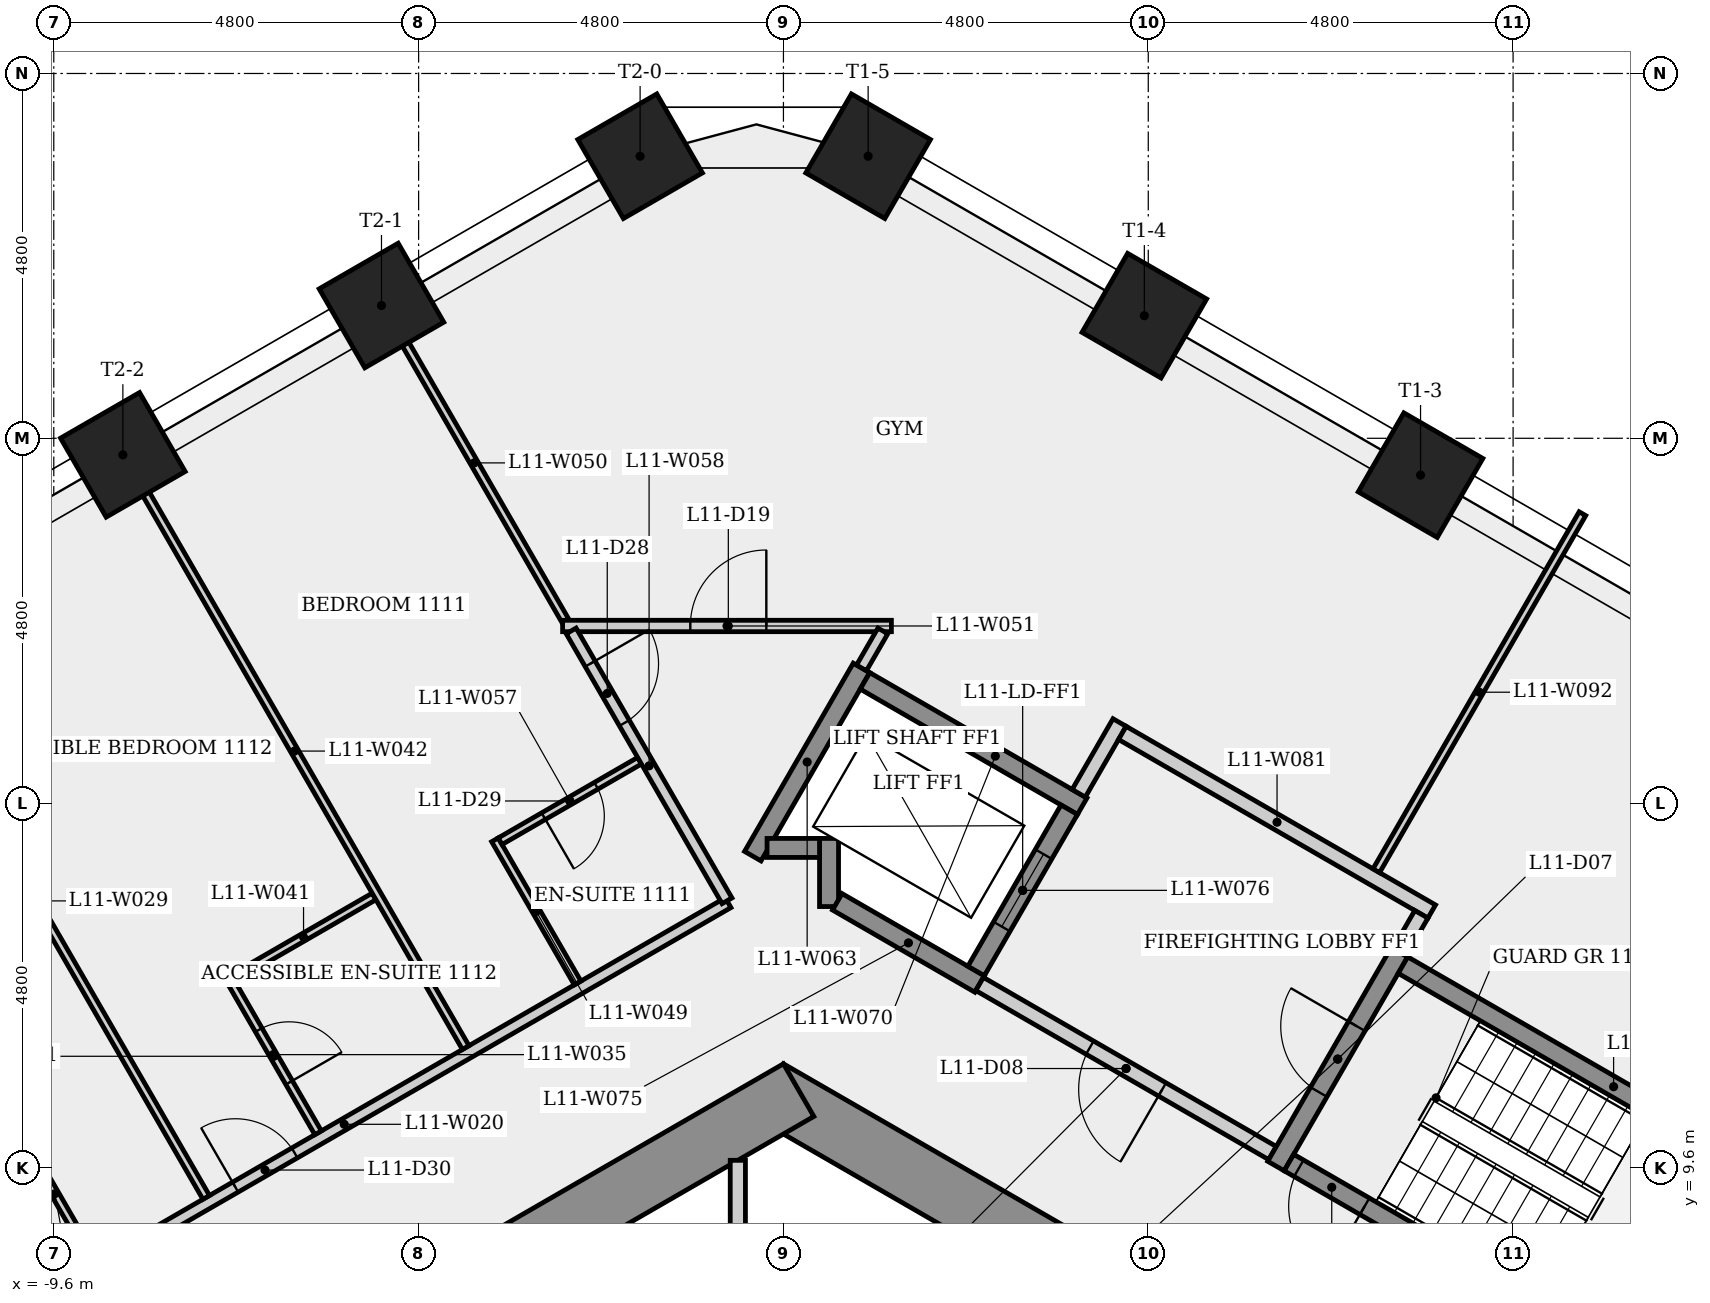
"""IFC4 building model, lengths in metres.
Left out: names, types, materials, properties, quantities, classifications, styles, units other than length and angle.
Written with IfcOpenShell. Run it as: python <this file> out.ifc"""

import sys

from ifc_helpers import new_model, si_unit, direction, frame, frame_2d, origin, origin_2d, place, context, subcontext, project, spatial, rectangle, extrude, element, fill, save


model = new_model("IFC4")
c1 = context("Model", 3, precision=1e-05, world=origin(), true_north=direction((0.0, 1.0)))
c2 = subcontext(c1, "Body", "Model", "MODEL_VIEW")
j1 = project(units=[si_unit("LENGTHUNIT", "METRE"), si_unit("PLANEANGLEUNIT", "RADIAN")], contexts=[c1])
p1 = place(None, origin())
s1 = spatial("IfcSite", under=j1, at=p1, CompositionType="ELEMENT")
p2 = place(p1, origin())
s2 = spatial("IfcBuilding", under=s1, at=p2, CompositionType="ELEMENT")
p3 = place(p2, frame((0.0, 0.0, 45.9)))
s3 = spatial("IfcBuildingStorey", under=s2, at=p3, CompositionType="ELEMENT", Elevation=45.9)
p4 = place(p3, frame((9.3, 5.138, 0.0), z_axis=(0.0, 0.0, 1.0), x_axis=(-0.866023993627, 0.500002442456, 0.0)))
e1 = element("IfcWall", 1, at=p4, inside=s3, PredefinedType="SHEAR", context=c2, shape_type="SweptSolid", body=[
    extrude(rectangle(XDim=10.97, YDim=0.8, at=frame_2d((5.485, 0.0))), origin(), (0.0, 0.0, 1.0), 3.4),
])
p5 = place(p4, frame((5.509, 0.0, 0.0)))
e2 = element("IfcOpeningElement", 2, at=p5, cuts=e1, PredefinedType="OPENING", context=c2, shape_type="SweptSolid", body=[
    extrude(rectangle(XDim=0.9, YDim=2.1, at=frame_2d((0.45, 1.05))), frame((0.0, 0.41, 0.0), z_axis=(0.0, -1.0, 0.0), x_axis=(1.0, 0.0, 0.0)), (0.0, 0.0, 1.0), 0.82),
])
p6 = place(p3, frame((0.2, 10.623, 0.0), z_axis=(0.0, 0.0, 1.0), x_axis=(-0.866023993627, -0.500002442456, 0.0)))
e3 = element("IfcWall", 3, at=p6, inside=s3, PredefinedType="SHEAR", context=c2, shape_type="SweptSolid", body=[
    extrude(rectangle(XDim=10.97, YDim=0.8, at=frame_2d((5.485, 0.0))), origin(), (0.0, 0.0, 1.0), 3.4),
])
p7 = place(p6, frame((6.993, 0.0, 0.0)))
e4 = element("IfcOpeningElement", 4, at=p7, cuts=e3, PredefinedType="OPENING", context=c2, shape_type="SweptSolid", body=[
    extrude(rectangle(XDim=0.9, YDim=2.1, at=frame_2d((0.45, 1.05))), frame((0.0, 0.41, 0.0), z_axis=(0.0, -1.0, 0.0), x_axis=(1.0, 0.0, 0.0)), (0.0, 0.0, 1.0), 0.82),
])
for number, where, z_axis, x_axis in (
    (5, (8.382, 18.715, 0.0), (0.0, 0.0, 1.0), (0.5, 0.866, 0.0)),
    (6, (4.748, 20.813, 0.0), (0.0, 0.0, 1.0), (0.5, 0.866, 0.0)),
    (7, (1.114, 22.911, 0.0), (0.0, 0.0, 1.0), (0.5, 0.866, 0.0)),
    (8, (-1.886, 22.911, 0.0), (0.0, 0.0, 1.0), (-0.5, 0.866, 0.0)),
    (9, (-5.288, 20.947, 0.0), (0.0, 0.0, 1.0), (-0.5, 0.866, 0.0)),
    (10, (-8.691, 18.982, 0.0), (0.0, 0.0, 1.0), (-0.5, 0.866, 0.0)),
):
    element("IfcColumn", number, at=place(p3, frame(where, z_axis=z_axis, x_axis=x_axis)), inside=s3, PredefinedType="COLUMN", context=c2, shape_type="SweptSolid", body=[
        extrude(rectangle(XDim=1.2, YDim=1.2, at=origin_2d()), origin(), (0.0, 0.0, 1.0), 3.4),
    ])
p8 = place(p3, frame((-10.83, 7.258, 0.0), z_axis=(0.0, 0.0, 1.0), x_axis=(0.86602420186, 0.500002081789, 0.0)))
e11 = element("IfcWall", 11, at=p8, inside=s3, PredefinedType="PARTITIONING", context=c2, shape_type="SweptSolid", body=[
    extrude(rectangle(XDim=11.664, YDim=0.15, at=frame_2d((5.832, 0.0))), origin(), (0.0, 0.0, 1.0), 3.05),
])
p9 = place(p8, frame((4.178, 0.0, 0.0)))
e12 = element("IfcOpeningElement", 12, at=p9, cuts=e11, PredefinedType="OPENING", context=c2, shape_type="SweptSolid", body=[
    extrude(rectangle(XDim=0.9, YDim=2.1, at=frame_2d((0.45, 1.05))), frame((0.0, 0.085, 0.0), z_axis=(0.0, -1.0, 0.0), x_axis=(1.0, 0.0, 0.0)), (0.0, 0.0, 1.0), 0.17),
])
p10 = place(p3, frame((-9.067, 8.362, 0.0), z_axis=(0.0, 0.0, 1.0), x_axis=(-0.500061949227, 0.865989634427, 0.0)))
e13 = element("IfcWall", 13, at=p10, inside=s3, PredefinedType="PARTITIONING", context=c2, shape_type="SweptSolid", body=[
    extrude(rectangle(XDim=2.075, YDim=0.1, at=frame_2d((1.038, 0.0))), origin(), (0.0, 0.0, 1.0), 3.05),
])
p11 = place(p3, frame((-7.595, 9.212, 0.0), z_axis=(0.0, 0.0, 1.0), x_axis=(-0.500009404554, 0.866019973994, 0.0)))
e14 = element("IfcWall", 14, at=p11, inside=s3, PredefinedType="PARTITIONING", context=c2, shape_type="SweptSolid", body=[
    extrude(rectangle(XDim=9.01, YDim=0.1, at=frame_2d((4.505, 0.0))), origin(), (0.0, 0.0, 1.0), 3.05),
])
p12 = place(p3, frame((-7.31, 12.119, 0.0), z_axis=(0.0, 0.0, 1.0), x_axis=(0.499986429846, -0.866033238375, 0.0)))
e15 = element("IfcWall", 15, at=p12, inside=s3, PredefinedType="PARTITIONING", context=c2, shape_type="SweptSolid", body=[
    extrude(rectangle(XDim=2.375, YDim=0.1, at=frame_2d((1.188, 0.0))), origin(), (0.0, 0.0, 1.0), 3.05),
])
p13 = place(p12, frame((0.812, 0.0, 0.0)))
e16 = element("IfcOpeningElement", 16, at=p13, cuts=e15, PredefinedType="OPENING", context=c2, shape_type="SweptSolid", body=[
    extrude(rectangle(XDim=0.8, YDim=2.1, at=frame_2d((0.4, 1.05))), frame((0.0, 0.06, 0.0), z_axis=(0.0, -1.0, 0.0), x_axis=(1.0, 0.0, 0.0)), (0.0, 0.0, 1.0), 0.12),
])
p14 = place(p3, frame((-5.386, 13.172, 0.0), z_axis=(0.0, 0.0, 1.0), x_axis=(-0.86604708139, -0.499962451406, 0.0)))
e17 = element("IfcWall", 17, at=p14, inside=s3, PredefinedType="PARTITIONING", context=c2, shape_type="SweptSolid", body=[
    extrude(rectangle(XDim=2.143, YDim=0.1, at=frame_2d((1.071, 0.0))), origin(), (0.0, 0.0, 1.0), 3.05),
])
p15 = place(p3, frame((-8.685, 18.986, 0.0), z_axis=(0.0, 0.0, 1.0), x_axis=(0.499989081013, -0.866031707772, 0.0)))
e18 = element("IfcWall", 18, at=p15, inside=s3, PredefinedType="PARTITIONING", context=c2, shape_type="SweptSolid", body=[
    extrude(rectangle(XDim=9.01, YDim=0.1, at=frame_2d((4.505, 0.0))), origin(), (0.0, 0.0, 1.0), 3.05),
])
p16 = place(p3, frame((-3.795, 13.917, 0.0), z_axis=(0.0, 0.0, 1.0), x_axis=(0.499978335414, -0.866037911478, 0.0)))
e19 = element("IfcWall", 19, at=p16, inside=s3, PredefinedType="PARTITIONING", context=c2, shape_type="SweptSolid", body=[
    extrude(rectangle(XDim=2.175, YDim=0.1, at=frame_2d((1.087, 0.0))), origin(), (0.0, 0.0, 1.0), 3.05),
])
p17 = place(p3, frame((-2.868, 16.795, 0.0), z_axis=(0.0, 0.0, 1.0), x_axis=(-0.499980464184, 0.866036682499, 0.0)))
e20 = element("IfcWall", 20, at=p17, inside=s3, PredefinedType="PARTITIONING", context=c2, shape_type="SweptSolid", body=[
    extrude(rectangle(XDim=4.805, YDim=0.1, at=frame_2d((2.403, 0.0))), origin(), (0.0, 0.0, 1.0), 3.05),
])
p18 = place(p3, frame((-2.905, 16.73, 0.0), z_axis=(0.0, 0.0, 1.0), x_axis=(1.0, 0.0, 0.0)))
e21 = element("IfcWall", 21, at=p18, inside=s3, PredefinedType="PARTITIONING", context=c2, shape_type="SweptSolid", body=[
    extrude(rectangle(XDim=4.326, YDim=0.15, at=frame_2d((2.163, 0.0))), origin(), (0.0, 0.0, 1.0), 3.05),
])
p19 = place(p18, frame((1.68, 0.0, 0.0)))
e22 = element("IfcOpeningElement", 22, at=p19, cuts=e21, PredefinedType="OPENING", context=c2, shape_type="SweptSolid", body=[
    extrude(rectangle(XDim=1.0, YDim=2.1, at=frame_2d((0.5, 1.05))), frame((0.0, 0.085, 0.0), z_axis=(0.0, -1.0, 0.0), x_axis=(1.0, 0.0, 0.0)), (0.0, 0.0, 1.0), 0.17),
])
p20 = place(p3, frame((-1.893, 14.957, 0.0), z_axis=(0.0, 0.0, 1.0), x_axis=(-0.866028160477, -0.499995225238, 0.0)))
e23 = element("IfcWall", 23, at=p20, inside=s3, PredefinedType="PARTITIONING", context=c2, shape_type="SweptSolid", body=[
    extrude(rectangle(XDim=2.118, YDim=0.1, at=frame_2d((1.059, 0.0))), origin(), (0.0, 0.0, 1.0), 3.05),
])
p21 = place(p20, frame((0.659, 0.0, 0.0)))
e24 = element("IfcOpeningElement", 24, at=p21, cuts=e23, PredefinedType="OPENING", context=c2, shape_type="SweptSolid", body=[
    extrude(rectangle(XDim=0.8, YDim=2.1, at=frame_2d((0.4, 1.05))), frame((0.0, 0.06, 0.0), z_axis=(0.0, -1.0, 0.0), x_axis=(1.0, 0.0, 0.0)), (0.0, 0.0, 1.0), 0.12),
])
p22 = place(p3, frame((-2.793, 16.665, 0.0), z_axis=(0.0, 0.0, 1.0), x_axis=(0.499993881836, -0.866028936079, 0.0)))
e25 = element("IfcWall", 25, at=p22, inside=s3, PredefinedType="PARTITIONING", context=c2, shape_type="SweptSolid", body=[
    extrude(rectangle(XDim=4.101, YDim=0.15, at=frame_2d((2.05, 0.0))), origin(), (0.0, 0.0, 1.0), 3.05),
])
p23 = place(p22, frame((0.5, 0.0, 0.0)))
e26 = element("IfcOpeningElement", 26, at=p23, cuts=e25, PredefinedType="OPENING", context=c2, shape_type="SweptSolid", body=[
    extrude(rectangle(XDim=0.9, YDim=2.1, at=frame_2d((0.45, 1.05))), frame((0.0, 0.085, 0.0), z_axis=(0.0, -1.0, 0.0), x_axis=(1.0, 0.0, 0.0)), (0.0, 0.0, 1.0), 0.17),
])
p24 = place(p3, frame((-0.6, 9.699, 0.0), z_axis=(0.0, 0.0, 1.0), x_axis=(0.0, -1.0, 0.0)))
e27 = element("IfcWall", 27, at=p24, inside=s3, PredefinedType="PARTITIONING", context=c2, shape_type="SweptSolid", body=[
    extrude(rectangle(XDim=4.425, YDim=0.2, at=frame_2d((2.212, 0.0))), origin(), (0.0, 0.0, 1.0), 3.05),
])
p25 = place(p3, frame((-0.403, 13.702, 0.0), z_axis=(0.0, 0.0, 1.0), x_axis=(0.499976111731, 0.866039195244, 0.0)))
e28 = element("IfcWall", 28, at=p25, inside=s3, PredefinedType="SHEAR", context=c2, shape_type="SweptSolid", body=[
    extrude(rectangle(XDim=2.861, YDim=0.25, at=frame_2d((1.43, 0.0))), origin(), (0.0, 0.0, 1.0), 3.05),
])
p26 = place(p3, frame((0.6, 13.039, 0.0), z_axis=(0.0, 0.0, 1.0), x_axis=(0.0, 1.0, 0.0)))
e29 = element("IfcWall", 29, at=p26, inside=s3, PredefinedType="SHEAR", context=c2, shape_type="SweptSolid", body=[
    extrude(rectangle(XDim=0.896, YDim=0.25, at=frame_2d((0.448, 0.0))), origin(), (0.0, 0.0, 1.0), 3.05),
])
p27 = place(p3, frame((0.475, 13.81, 0.0), z_axis=(0.0, 0.0, 1.0), x_axis=(-1.0, 0.0, 0.0)))
e30 = element("IfcWall", 30, at=p27, inside=s3, PredefinedType="SHEAR", context=c2, shape_type="SweptSolid", body=[
    extrude(rectangle(XDim=0.691, YDim=0.25, at=frame_2d((0.345, 0.0))), origin(), (0.0, 0.0, 1.0), 3.4),
])
p28 = place(p3, frame((1.073, 16.008, 0.0), z_axis=(0.0, 0.0, 1.0), x_axis=(0.866040211805, -0.499974350878, 0.0)))
e31 = element("IfcWall", 31, at=p28, inside=s3, PredefinedType="SHEAR", context=c2, shape_type="SweptSolid", body=[
    extrude(rectangle(XDim=3.3, YDim=0.25, at=frame_2d((1.65, 0.0))), origin(), (0.0, 0.0, 1.0), 3.05),
])
p29 = place(p3, frame((1.308, 16.665, 0.0), z_axis=(0.0, 0.0, 1.0), x_axis=(-0.499973348067, -0.866040790738, 0.0)))
e32 = element("IfcWall", 32, at=p29, inside=s3, PredefinedType="PARTITIONING", context=c2, shape_type="SweptSolid", body=[
    extrude(rectangle(XDim=0.562, YDim=0.15, at=frame_2d((0.281, 0.0))), origin(), (0.0, 0.0, 1.0), 3.05),
])
p30 = place(p3, frame((2.581, 12.02, 0.0), z_axis=(0.0, 0.0, 1.0), x_axis=(-0.86603892542, 0.499976579108, 0.0)))
e33 = element("IfcWall", 33, at=p30, inside=s3, PredefinedType="SHEAR", context=c2, shape_type="SweptSolid", body=[
    extrude(rectangle(XDim=2.162, YDim=0.25, at=frame_2d((1.081, 0.0))), origin(), (0.0, 0.0, 1.0), 3.05),
])
p31 = place(p3, frame((2.535, 12.191, 0.0), z_axis=(0.0, 0.0, 1.0), x_axis=(0.500061746146, 0.865989751695, 0.0)))
e34 = element("IfcWall", 34, at=p31, inside=s3, PredefinedType="SHEAR", context=c2, shape_type="SweptSolid", body=[
    extrude(rectangle(XDim=2.45, YDim=0.25, at=frame_2d((1.225, 0.0))), origin(), (0.0, 0.0, 1.0), 3.4),
])
p32 = place(p31, frame((0.675, 0.0, 0.0)))
e35 = element("IfcOpeningElement", 35, at=p32, cuts=e34, PredefinedType="OPENING", context=c2, shape_type="SweptSolid", body=[
    extrude(rectangle(XDim=1.1, YDim=2.1, at=frame_2d((0.55, 1.05))), frame((0.0, 0.135, 0.0), z_axis=(0.0, -1.0, 0.0), x_axis=(1.0, 0.0, 0.0)), (0.0, 0.0, 1.0), 0.27),
])
p33 = place(p3, frame((3.885, 14.529, 0.0), z_axis=(0.0, 0.0, 1.0), x_axis=(0.499997628298, 0.866026773083, 0.0)))
e36 = element("IfcWall", 36, at=p33, inside=s3, PredefinedType="PARTITIONING", context=c2, shape_type="SweptSolid", body=[
    extrude(rectangle(XDim=1.075, YDim=0.2, at=frame_2d((0.538, 0.0))), origin(), (0.0, 0.0, 1.0), 3.05),
])
p34 = place(p3, frame((4.459, 15.323, 0.0), z_axis=(0.0, 0.0, 1.0), x_axis=(0.866016039709, -0.500016218704, 0.0)))
e37 = element("IfcWall", 37, at=p34, inside=s3, PredefinedType="PARTITIONING", context=c2, shape_type="SweptSolid", body=[
    extrude(rectangle(XDim=4.7, YDim=0.2, at=frame_2d((2.35, 0.0))), origin(), (0.0, 0.0, 1.0), 3.05),
])
p35 = place(p3, frame((6.435, 9.795, 0.0), z_axis=(0.0, 0.0, 1.0), x_axis=(-0.866012907634, 0.500021643343, 0.0)))
e38 = element("IfcWall", 38, at=p35, inside=s3, PredefinedType="PARTITIONING", context=c2, shape_type="SweptSolid", body=[
    extrude(rectangle(XDim=4.45, YDim=0.2, at=frame_2d((2.225, 0.0))), origin(), (0.0, 0.0, 1.0), 3.05),
])
p36 = place(p35, frame((1.675, 0.0, 0.0)))
e39 = element("IfcOpeningElement", 39, at=p36, cuts=e38, PredefinedType="OPENING", context=c2, shape_type="SweptSolid", body=[
    extrude(rectangle(XDim=1.1, YDim=2.1, at=frame_2d((0.55, 1.05))), frame((0.0, 0.11, 0.0), z_axis=(0.0, -1.0, 0.0), x_axis=(1.0, 0.0, 0.0)), (0.0, 0.0, 1.0), 0.22),
])
p37 = place(p3, frame((6.48, 9.624, 0.0), z_axis=(0.0, 0.0, 1.0), x_axis=(0.500017246033, 0.866015446554, 0.0)))
e40 = element("IfcWall", 40, at=p37, inside=s3, PredefinedType="SHEAR", context=c2, shape_type="SweptSolid", body=[
    extrude(rectangle(XDim=3.25, YDim=0.25, at=frame_2d((1.625, 0.0))), origin(), (0.0, 0.0, 1.0), 3.05),
])
p38 = place(p37, frame((1.125, 0.0, 0.0)))
e41 = element("IfcOpeningElement", 41, at=p38, cuts=e40, PredefinedType="OPENING", context=c2, shape_type="SweptSolid", body=[
    extrude(rectangle(XDim=1.0, YDim=2.1, at=frame_2d((0.5, 1.05))), frame((0.0, 0.135, 0.0), z_axis=(0.0, -1.0, 0.0), x_axis=(1.0, 0.0, 0.0)), (0.0, 0.0, 1.0), 0.27),
])
p39 = place(p3, frame((7.8, 13.51, 0.0), z_axis=(0.0, 0.0, 1.0), x_axis=(0.499987379426, 0.866032690154, 0.0)))
e42 = element("IfcWall", 42, at=p39, inside=s3, PredefinedType="PARTITIONING", context=c2, shape_type="SweptSolid", body=[
    extrude(rectangle(XDim=5.425, YDim=0.1, at=frame_2d((2.712, 0.0))), origin(), (0.0, 0.0, 1.0), 3.05),
])
p40 = place(p3, frame((8.151, 12.268, 0.0), z_axis=(0.0, 0.0, 1.0), x_axis=(0.866025499775, -0.499999833739, 0.0)))
e43 = element("IfcWall", 43, at=p40, inside=s3, PredefinedType="SHEAR", context=c2, shape_type="SweptSolid", body=[
    extrude(rectangle(XDim=6.4, YDim=0.25, at=frame_2d((3.2, 0.0))), origin(), (0.0, 0.0, 1.0), 3.05),
])
p41 = place(p3, frame((8.393, 12.937, 0.0), z_axis=(0.0, 0.0, 1.0), x_axis=(-0.500065409566, -0.86598763626, 0.0)))
e44 = element("IfcWall", 44, at=p41, inside=s3, PredefinedType="PARTITIONING", context=c2, shape_type="SweptSolid", body=[
    extrude(rectangle(XDim=0.575, YDim=0.2, at=frame_2d((0.288, 0.0))), origin(), (0.0, 0.0, 1.0), 3.05),
])
p42 = place(p3, frame((12.194, 6.47, 0.0), z_axis=(0.0, 0.0, 1.0), x_axis=(-0.866025499775, 0.499999833739, 0.0)))
e45 = element("IfcWall", 45, at=p42, inside=s3, PredefinedType="SHEAR", context=c2, shape_type="SweptSolid", body=[
    extrude(rectangle(XDim=6.4, YDim=0.25, at=frame_2d((3.2, 0.0))), origin(), (0.0, 0.0, 1.0), 3.05),
])
p43 = place(p42, frame((5.25, 0.0, 0.0)))
e46 = element("IfcOpeningElement", 46, at=p43, cuts=e45, PredefinedType="OPENING", context=c2, shape_type="SweptSolid", body=[
    extrude(rectangle(XDim=1.0, YDim=2.1, at=frame_2d((0.5, 1.05))), frame((0.0, 0.135, 0.0), z_axis=(0.0, -1.0, 0.0), x_axis=(1.0, 0.0, 0.0)), (0.0, 0.0, 1.0), 0.27),
])
p44 = place(p43, origin())
e47 = element("IfcDoor", 47, at=p44, inside=s3, OperationType="SINGLE_SWING_LEFT", PredefinedType="DOOR", context=c2, shape_type="SweptSolid", body=[
    extrude(rectangle(XDim=1.0, YDim=2.1, at=frame_2d((0.5, 1.05))), frame((0.0, 0.025, 0.0), z_axis=(0.0, -1.0, 0.0), x_axis=(1.0, 0.0, 0.0)), (0.0, 0.0, 1.0), 0.05),
])
fill(e46, e47)
p45 = place(p38, origin())
e48 = element("IfcDoor", 48, at=p45, inside=s3, OperationType="SINGLE_SWING_RIGHT", PredefinedType="DOOR", context=c2, shape_type="SweptSolid", body=[
    extrude(rectangle(XDim=1.0, YDim=2.1, at=frame_2d((0.5, 1.05))), frame((0.0, 0.025, 0.0), z_axis=(0.0, -1.0, 0.0), x_axis=(1.0, 0.0, 0.0)), (0.0, 0.0, 1.0), 0.05),
])
fill(e41, e48)
p46 = place(p36, origin())
e49 = element("IfcDoor", 49, at=p46, inside=s3, OperationType="SINGLE_SWING_LEFT", PredefinedType="DOOR", context=c2, shape_type="SweptSolid", body=[
    extrude(rectangle(XDim=1.1, YDim=2.1, at=frame_2d((0.55, 1.05))), frame((0.0, 0.025, 0.0), z_axis=(0.0, -1.0, 0.0), x_axis=(1.0, 0.0, 0.0)), (0.0, 0.0, 1.0), 0.05),
])
fill(e39, e49)
p47 = place(p32, origin())
e50 = element("IfcDoor", 50, at=p47, inside=s3, OperationType="SLIDING_TO_LEFT", PredefinedType="DOOR", context=c2, shape_type="SweptSolid", body=[
    extrude(rectangle(XDim=1.1, YDim=2.1, at=frame_2d((0.55, 1.05))), frame((0.0, 0.025, 0.0), z_axis=(0.0, -1.0, 0.0), x_axis=(1.0, 0.0, 0.0)), (0.0, 0.0, 1.0), 0.05),
])
fill(e35, e50)
p48 = place(p19, origin())
e51 = element("IfcDoor", 51, at=p48, inside=s3, OperationType="SINGLE_SWING_RIGHT", PredefinedType="DOOR", context=c2, shape_type="SweptSolid", body=[
    extrude(rectangle(XDim=1.0, YDim=2.1, at=frame_2d((0.5, 1.05))), frame((0.0, 0.025, 0.0), z_axis=(0.0, -1.0, 0.0), x_axis=(1.0, 0.0, 0.0)), (0.0, 0.0, 1.0), 0.05),
])
fill(e22, e51)
p49 = place(p23, origin())
e52 = element("IfcDoor", 52, at=p49, inside=s3, OperationType="SINGLE_SWING_LEFT", PredefinedType="DOOR", context=c2, shape_type="SweptSolid", body=[
    extrude(rectangle(XDim=0.9, YDim=2.1, at=frame_2d((0.45, 1.05))), frame((0.0, 0.025, 0.0), z_axis=(0.0, -1.0, 0.0), x_axis=(1.0, 0.0, 0.0)), (0.0, 0.0, 1.0), 0.05),
])
fill(e26, e52)
p50 = place(p21, origin())
e53 = element("IfcDoor", 53, at=p50, inside=s3, OperationType="SINGLE_SWING_RIGHT", PredefinedType="DOOR", context=c2, shape_type="SweptSolid", body=[
    extrude(rectangle(XDim=0.8, YDim=2.1, at=frame_2d((0.4, 1.05))), frame((0.0, 0.025, 0.0), z_axis=(0.0, -1.0, 0.0), x_axis=(1.0, 0.0, 0.0)), (0.0, 0.0, 1.0), 0.05),
])
fill(e24, e53)
p51 = place(p9, origin())
e54 = element("IfcDoor", 54, at=p51, inside=s3, OperationType="SINGLE_SWING_LEFT", PredefinedType="DOOR", context=c2, shape_type="SweptSolid", body=[
    extrude(rectangle(XDim=0.9, YDim=2.1, at=frame_2d((0.45, 1.05))), frame((0.0, 0.025, 0.0), z_axis=(0.0, -1.0, 0.0), x_axis=(1.0, 0.0, 0.0)), (0.0, 0.0, 1.0), 0.05),
])
fill(e12, e54)
p52 = place(p13, origin())
e55 = element("IfcDoor", 55, at=p52, inside=s3, OperationType="SINGLE_SWING_RIGHT", PredefinedType="DOOR", context=c2, shape_type="SweptSolid", body=[
    extrude(rectangle(XDim=0.8, YDim=2.1, at=frame_2d((0.4, 1.05))), frame((0.0, 0.025, 0.0), z_axis=(0.0, -1.0, 0.0), x_axis=(1.0, 0.0, 0.0)), (0.0, 0.0, 1.0), 0.05),
])
fill(e16, e55)
save(model, sys.argv[1])
